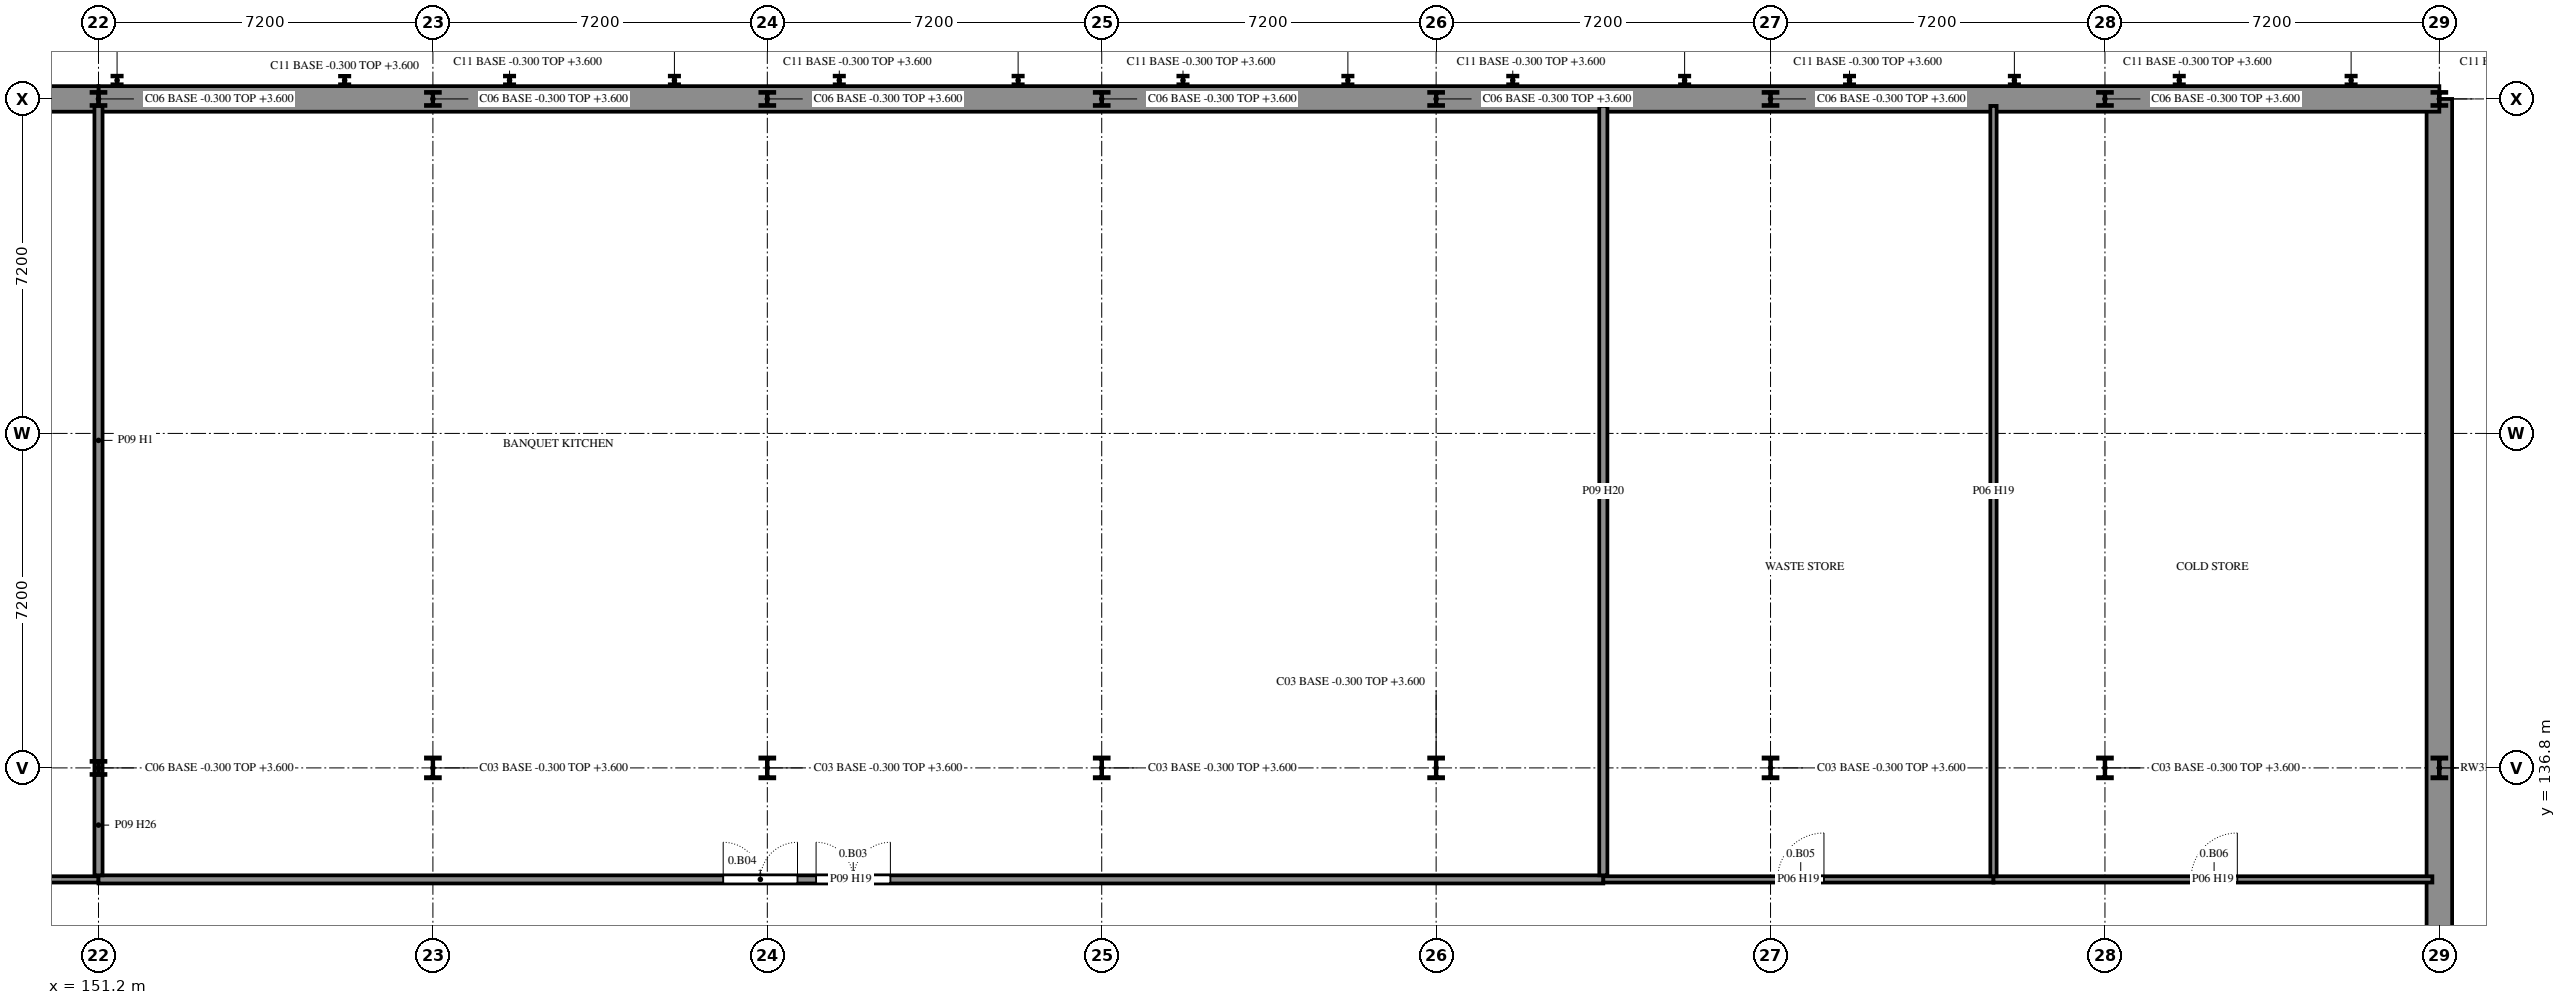
"""IFC4 building model, lengths in metres.
Left out: names, types, materials, properties, quantities, classifications, styles, units other than length and angle.
Written with IfcOpenShell. Run it as: python <this file> out.ifc"""

import sys

from ifc_helpers import new_model, si_unit, direction, frame, frame_2d, origin, origin_2d, place, context, subcontext, project, spatial, rectangle, i_section, extrude, element, fill, save


model = new_model("IFC4")
c1 = context("Model", 3, precision=1e-05, world=origin(), true_north=direction((0.0, 1.0)))
c2 = subcontext(c1, "Body", "Model", "MODEL_VIEW")
j1 = project(units=[si_unit("LENGTHUNIT", "METRE"), si_unit("PLANEANGLEUNIT", "RADIAN")], contexts=[c1])
p1 = place(None, origin())
s1 = spatial("IfcSite", under=j1, at=p1, CompositionType="ELEMENT")
p2 = place(p1, origin())
s2 = spatial("IfcBuilding", under=s1, at=p2, CompositionType="ELEMENT")
p3 = place(p2, origin())
s3 = spatial("IfcBuildingStorey", under=s2, at=p3, CompositionType="ELEMENT", Elevation=0.0)
for number, where, z_axis, x_axis in (
    (1, (151.2, 151.2, -0.3), (0.0, 0.0, 1.0), (1.0, 0.0, 0.0)),
    (2, (158.4, 151.2, -0.3), (0.0, 0.0, 1.0), (1.0, 0.0, 0.0)),
    (3, (165.6, 151.2, -0.3), (0.0, 0.0, 1.0), (1.0, 0.0, 0.0)),
    (4, (172.8, 151.2, -0.3), (0.0, 0.0, 1.0), (1.0, 0.0, 0.0)),
    (5, (180.0, 151.2, -0.3), (0.0, 0.0, 1.0), (1.0, 0.0, 0.0)),
    (6, (187.2, 151.2, -0.3), (0.0, 0.0, 1.0), (1.0, 0.0, 0.0)),
    (7, (194.4, 151.2, -0.3), (0.0, 0.0, 1.0), (1.0, 0.0, 0.0)),
    (8, (201.6, 151.2, -0.3), (0.0, 0.0, 1.0), (1.0, 0.0, 0.0)),
    (9, (151.2, 136.8, -0.3), (0.0, 0.0, 1.0), (1.0, 0.0, 0.0)),
):
    element("IfcColumn", number, at=place(p3, frame(where, z_axis=z_axis, x_axis=x_axis)), inside=s3, PredefinedType="COLUMN", context=c2, shape_type="SweptSolid", body=[
        extrude(i_section(OverallWidth=0.3, OverallDepth=0.3, WebThickness=0.011, FlangeThickness=0.019, FilletRadius=0.027, at=origin_2d()), origin(), (0.0, 0.0, 1.0), 3.9),
    ])
for number, where, z_axis, x_axis in (
    (10, (158.4, 136.8, -0.3), (0.0, 0.0, 1.0), (1.0, 0.0, 0.0)),
    (11, (165.6, 136.8, -0.3), (0.0, 0.0, 1.0), (1.0, 0.0, 0.0)),
    (12, (172.8, 136.8, -0.3), (0.0, 0.0, 1.0), (1.0, 0.0, 0.0)),
    (13, (180.0, 136.8, -0.3), (0.0, 0.0, 1.0), (1.0, 0.0, 0.0)),
    (14, (187.2, 136.8, -0.3), (0.0, 0.0, 1.0), (1.0, 0.0, 0.0)),
    (15, (194.4, 136.8, -0.3), (0.0, 0.0, 1.0), (1.0, 0.0, 0.0)),
    (16, (201.6, 136.8, -0.3), (0.0, 0.0, 1.0), (1.0, 0.0, 0.0)),
):
    element("IfcColumn", number, at=place(p3, frame(where, z_axis=z_axis, x_axis=x_axis)), inside=s3, PredefinedType="COLUMN", context=c2, shape_type="SweptSolid", body=[
        extrude(i_section(OverallWidth=0.3, OverallDepth=0.45, WebThickness=0.014, FlangeThickness=0.026, FilletRadius=0.027, at=origin_2d()), origin(), (0.0, 0.0, 1.0), 3.9),
    ])
p4 = place(p3, frame((201.6, 122.4, 0.0), z_axis=(0.0, 0.0, 1.0), x_axis=(0.0, 1.0, 0.0)))
e17 = element("IfcWall", 17, at=p4, inside=s3, PredefinedType="SOLIDWALL", context=c2, shape_type="SweptSolid", body=[
    extrude(rectangle(XDim=28.8, YDim=0.55, at=frame_2d((14.4, 0.0))), origin(), (0.0, 0.0, 1.0), 3.6),
])
p5 = place(p3, frame((151.2, 151.2, 0.0), z_axis=(0.0, 0.0, 1.0), x_axis=(1.0, 0.0, 0.0)))
e18 = element("IfcWall", 18, at=p5, inside=s3, PredefinedType="SOLIDWALL", context=c2, shape_type="SweptSolid", body=[
    extrude(rectangle(XDim=50.4, YDim=0.55, at=frame_2d((25.2, 0.0))), origin(), (0.0, 0.0, 1.0), 3.6),
])
p6 = place(p3, frame((143.1, 151.2, 0.0), z_axis=(0.0, 0.0, 1.0), x_axis=(1.0, 0.0, 0.0)))
e19 = element("IfcWall", 19, at=p6, inside=s3, PredefinedType="SOLIDWALL", context=c2, shape_type="SweptSolid", body=[
    extrude(rectangle(XDim=8.1, YDim=0.55, at=frame_2d((4.05, 0.0))), origin(), (0.0, 0.0, 1.0), 3.6),
])
for number, where, z_axis, x_axis in (
    (20, (151.6, 151.6, -0.3), (0.0, 0.0, 1.0), (1.0, 0.0, 0.0)),
    (21, (156.5, 151.6, -0.3), (0.0, 0.0, 1.0), (1.0, 0.0, 0.0)),
    (22, (160.05, 151.6, -0.3), (0.0, 0.0, 1.0), (1.0, 0.0, 0.0)),
    (23, (163.6, 151.6, -0.3), (0.0, 0.0, 1.0), (1.0, 0.0, 0.0)),
    (24, (167.15, 151.6, -0.3), (0.0, 0.0, 1.0), (1.0, 0.0, 0.0)),
    (25, (171.0, 151.6, -0.3), (0.0, 0.0, 1.0), (1.0, 0.0, 0.0)),
    (26, (174.55, 151.6, -0.3), (0.0, 0.0, 1.0), (1.0, 0.0, 0.0)),
    (27, (178.1, 151.6, -0.3), (0.0, 0.0, 1.0), (1.0, 0.0, 0.0)),
    (28, (181.65, 151.6, -0.3), (0.0, 0.0, 1.0), (1.0, 0.0, 0.0)),
    (29, (185.35, 151.6, -0.3), (0.0, 0.0, 1.0), (1.0, 0.0, 0.0)),
    (30, (188.9, 151.6, -0.3), (0.0, 0.0, 1.0), (1.0, 0.0, 0.0)),
    (31, (192.45, 151.6, -0.3), (0.0, 0.0, 1.0), (1.0, 0.0, 0.0)),
    (32, (196.0, 151.6, -0.3), (0.0, 0.0, 1.0), (1.0, 0.0, 0.0)),
    (33, (199.7, 151.6, -0.3), (0.0, 0.0, 1.0), (1.0, 0.0, 0.0)),
):
    element("IfcColumn", number, at=place(p3, frame(where, z_axis=z_axis, x_axis=x_axis)), inside=s3, PredefinedType="COLUMN", context=c2, shape_type="SweptSolid", body=[
        extrude(i_section(OverallWidth=0.2, OverallDepth=0.2, WebThickness=0.009, FlangeThickness=0.015, FilletRadius=0.018, at=origin_2d()), origin(), (0.0, 0.0, 1.0), 3.9),
    ])
p7 = place(p3, frame((136.95, 134.4, 0.0), z_axis=(0.0, 0.0, 1.0), x_axis=(1.0, 0.0, 0.0)))
e34 = element("IfcWall", 34, at=p7, inside=s3, PredefinedType="PARTITIONING", context=c2, shape_type="SweptSolid", body=[
    extrude(rectangle(XDim=14.25, YDim=0.135, at=frame_2d((7.125, 0.0))), origin(), (0.0, 0.0, 1.0), 3.4),
])
p8 = place(p7, frame((6.65, 0.0, 0.0)))
e35 = element("IfcOpeningElement", 35, at=p8, cuts=e34, PredefinedType="OPENING", context=c2, shape_type="SweptSolid", body=[
    extrude(rectangle(XDim=1.0, YDim=2.4, at=frame_2d((0.5, 1.2))), frame((0.0, 0.077, 0.0), z_axis=(0.0, -1.0, 0.0), x_axis=(1.0, 0.0, 0.0)), (0.0, 0.0, 1.0), 0.155),
])
p9 = place(p3, frame((151.2, 134.4, 0.0), z_axis=(0.0, 0.0, 1.0), x_axis=(1.0, 0.0, 0.0)))
e36 = element("IfcWall", 36, at=p9, inside=s3, PredefinedType="PARTITIONING", context=c2, shape_type="SweptSolid", body=[
    extrude(rectangle(XDim=32.4, YDim=0.175, at=frame_2d((16.2, 0.0))), origin(), (0.0, 0.0, 1.0), 3.4),
])
p10 = place(p9, frame((15.45, 0.0, 0.0)))
e37 = element("IfcOpeningElement", 37, at=p10, cuts=e36, PredefinedType="OPENING", context=c2, shape_type="SweptSolid", body=[
    extrude(rectangle(XDim=1.6, YDim=2.1, at=frame_2d((0.8, 1.05))), frame((0.0, 0.097, 0.0), z_axis=(0.0, -1.0, 0.0), x_axis=(1.0, 0.0, 0.0)), (0.0, 0.0, 1.0), 0.195),
])
p11 = place(p9, frame((13.45, 0.0, 0.0)))
e38 = element("IfcOpeningElement", 38, at=p11, cuts=e36, PredefinedType="OPENING", context=c2, shape_type="SweptSolid", body=[
    extrude(rectangle(XDim=1.6, YDim=2.1, at=frame_2d((0.8, 1.05))), frame((0.0, 0.097, 0.0), z_axis=(0.0, -1.0, 0.0), x_axis=(1.0, 0.0, 0.0)), (0.0, 0.0, 1.0), 0.195),
])
p12 = place(p3, frame((183.6, 134.4, 0.0), z_axis=(0.0, 0.0, 1.0), x_axis=(1.0, 0.0, 0.0)))
e39 = element("IfcWall", 39, at=p12, inside=s3, PredefinedType="PARTITIONING", context=c2, shape_type="SweptSolid", body=[
    extrude(rectangle(XDim=8.4, YDim=0.135, at=frame_2d((4.2, 0.0))), origin(), (0.0, 0.0, 1.0), 3.4),
])
p13 = place(p12, frame((3.75, 0.0, 0.0)))
e40 = element("IfcOpeningElement", 40, at=p13, cuts=e39, PredefinedType="OPENING", context=c2, shape_type="SweptSolid", body=[
    extrude(rectangle(XDim=1.0, YDim=2.4, at=frame_2d((0.5, 1.2))), frame((0.0, 0.077, 0.0), z_axis=(0.0, -1.0, 0.0), x_axis=(1.0, 0.0, 0.0)), (0.0, 0.0, 1.0), 0.155),
])
p14 = place(p3, frame((192.0, 134.4, 0.0), z_axis=(0.0, 0.0, 1.0), x_axis=(1.0, 0.0, 0.0)))
e41 = element("IfcWall", 41, at=p14, inside=s3, PredefinedType="PARTITIONING", context=c2, shape_type="SweptSolid", body=[
    extrude(rectangle(XDim=9.45, YDim=0.135, at=frame_2d((4.725, 0.0))), origin(), (0.0, 0.0, 1.0), 3.4),
])
p15 = place(p14, frame((4.25, 0.0, 0.0)))
e42 = element("IfcOpeningElement", 42, at=p15, cuts=e41, PredefinedType="OPENING", context=c2, shape_type="SweptSolid", body=[
    extrude(rectangle(XDim=1.0, YDim=2.4, at=frame_2d((0.5, 1.2))), frame((0.0, 0.077, 0.0), z_axis=(0.0, -1.0, 0.0), x_axis=(1.0, 0.0, 0.0)), (0.0, 0.0, 1.0), 0.155),
])
p16 = place(p3, frame((151.2, 151.05, 0.0), z_axis=(0.0, 0.0, 1.0), x_axis=(0.0, -1.0, 0.0)))
e43 = element("IfcWall", 43, at=p16, inside=s3, PredefinedType="PARTITIONING", context=c2, shape_type="SweptSolid", body=[
    extrude(rectangle(XDim=14.4, YDim=0.175, at=frame_2d((7.2, 0.0))), origin(), (0.0, 0.0, 1.0), 2.82),
])
p17 = place(p3, frame((183.6, 151.05, 0.0), z_axis=(0.0, 0.0, 1.0), x_axis=(0.0, -1.0, 0.0)))
e44 = element("IfcWall", 44, at=p17, inside=s3, PredefinedType="PARTITIONING", context=c2, shape_type="SweptSolid", body=[
    extrude(rectangle(XDim=16.562, YDim=0.175, at=frame_2d((8.281, 0.0))), origin(), (0.0, 0.0, 1.0), 3.1),
])
p18 = place(p3, frame((192.0, 151.05, 0.0), z_axis=(0.0, 0.0, 1.0), x_axis=(0.0, -1.0, 0.0)))
e45 = element("IfcWall", 45, at=p18, inside=s3, PredefinedType="PARTITIONING", context=c2, shape_type="SweptSolid", body=[
    extrude(rectangle(XDim=16.583, YDim=0.135, at=frame_2d((8.291, 0.0))), origin(), (0.0, 0.0, 1.0), 3.4),
])
p19 = place(p3, frame((151.2, 136.65, 0.0), z_axis=(0.0, 0.0, 1.0), x_axis=(0.0, -1.0, 0.0)))
e46 = element("IfcWall", 46, at=p19, inside=s3, PredefinedType="PARTITIONING", context=c2, shape_type="SweptSolid", body=[
    extrude(rectangle(XDim=2.162, YDim=0.175, at=frame_2d((1.081, 0.0))), origin(), (0.0, 0.0, 1.0), 3.15),
])
p20 = place(p10, origin())
e47 = element("IfcDoor", 47, at=p20, inside=s3, OperationType="DOUBLE_DOOR_SINGLE_SWING", PredefinedType="DOOR", context=c2, shape_type="SweptSolid", body=[
    extrude(rectangle(XDim=1.6, YDim=2.1, at=frame_2d((0.8, 1.05))), frame((0.0, 0.025, 0.0), z_axis=(0.0, -1.0, 0.0), x_axis=(1.0, 0.0, 0.0)), (0.0, 0.0, 1.0), 0.05),
])
fill(e37, e47)
p21 = place(p11, origin())
e48 = element("IfcDoor", 48, at=p21, inside=s3, OperationType="DOUBLE_DOOR_SINGLE_SWING", PredefinedType="DOOR", context=c2, shape_type="SweptSolid", body=[
    extrude(rectangle(XDim=1.6, YDim=2.1, at=frame_2d((0.8, 1.05))), frame((0.0, 0.025, 0.0), z_axis=(0.0, -1.0, 0.0), x_axis=(1.0, 0.0, 0.0)), (0.0, 0.0, 1.0), 0.05),
])
fill(e38, e48)
p22 = place(p13, origin())
e49 = element("IfcDoor", 49, at=p22, inside=s3, OperationType="SINGLE_SWING_LEFT", PredefinedType="DOOR", context=c2, shape_type="SweptSolid", body=[
    extrude(rectangle(XDim=1.0, YDim=2.4, at=frame_2d((0.5, 1.2))), frame((0.0, 0.025, 0.0), z_axis=(0.0, -1.0, 0.0), x_axis=(1.0, 0.0, 0.0)), (0.0, 0.0, 1.0), 0.05),
])
fill(e40, e49)
p23 = place(p15, origin())
e50 = element("IfcDoor", 50, at=p23, inside=s3, OperationType="SINGLE_SWING_LEFT", PredefinedType="DOOR", context=c2, shape_type="SweptSolid", body=[
    extrude(rectangle(XDim=1.0, YDim=2.4, at=frame_2d((0.5, 1.2))), frame((0.0, 0.025, 0.0), z_axis=(0.0, -1.0, 0.0), x_axis=(1.0, 0.0, 0.0)), (0.0, 0.0, 1.0), 0.05),
])
fill(e42, e50)
save(model, sys.argv[1])
